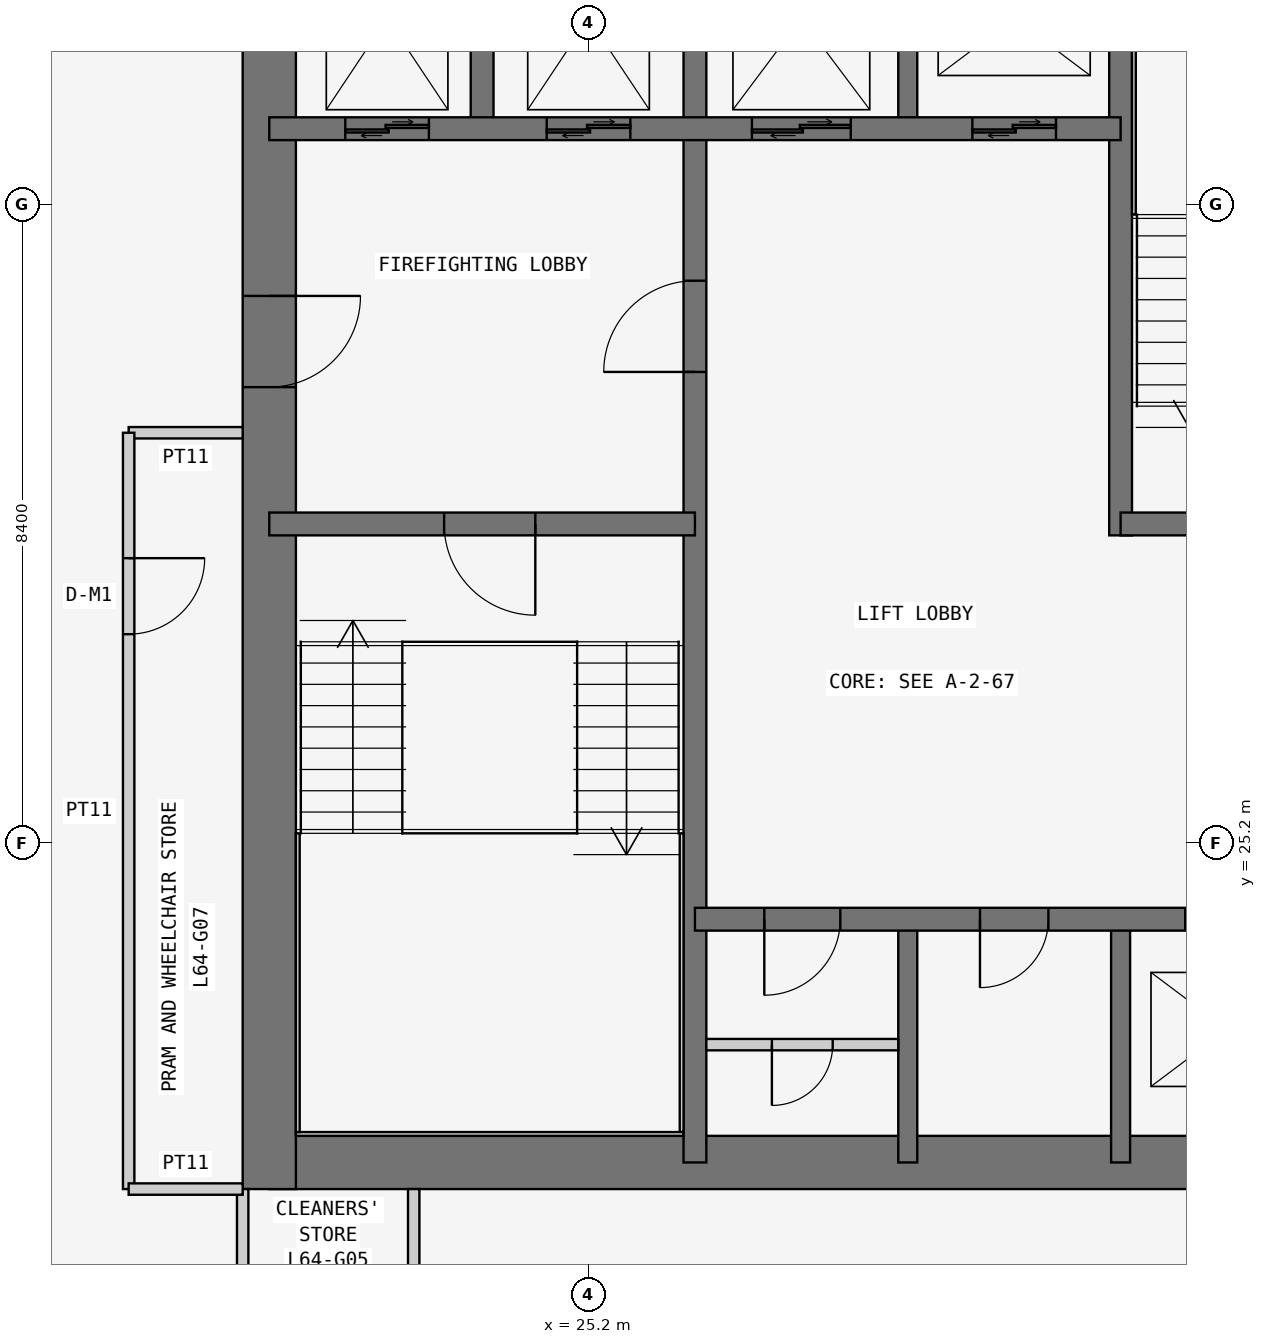
"""IFC4 building model, lengths in metres.
Left out: names, types, materials, properties, quantities, classifications, styles, units other than length and angle.
Written with IfcOpenShell. Run it as: python <this file> out.ifc"""

import sys

from ifc_helpers import new_model, si_unit, direction, frame, frame_2d, origin, place, context, subcontext, project, spatial, rectangle, extrude, element, fill, save


model = new_model("IFC4")
c1 = context("Model", 3, precision=1e-05, world=origin(), true_north=direction((0.0, 1.0)))
c2 = subcontext(c1, "Body", "Model", "MODEL_VIEW")
j1 = project(units=[si_unit("LENGTHUNIT", "METRE"), si_unit("PLANEANGLEUNIT", "RADIAN")], contexts=[c1])
p1 = place(None, origin())
s1 = spatial("IfcSite", under=j1, at=p1, CompositionType="ELEMENT")
p2 = place(p1, origin())
s2 = spatial("IfcBuilding", under=s1, at=p2, CompositionType="ELEMENT")
p3 = place(p2, frame((0.0, 0.0, 244.5)))
s3 = spatial("IfcBuildingStorey", under=s2, at=p3, CompositionType="ELEMENT", Elevation=244.5)
p4 = place(p3, frame((21.0, 21.0, 0.0), z_axis=(0.0, 0.0, 1.0), x_axis=(1.0, 0.0, 0.0)))
e1 = element("IfcWall", 1, at=p4, inside=s3, PredefinedType="SHEAR", context=c2, shape_type="SweptSolid", body=[
    extrude(rectangle(XDim=17.15, YDim=0.7, at=frame_2d((8.575, 0.0))), origin(), (0.0, 0.0, 1.0), 3.6),
])
p5 = place(p3, frame((21.0, 37.8, 0.0), z_axis=(0.0, 0.0, 1.0), x_axis=(0.0, -1.0, 0.0)))
e2 = element("IfcWall", 2, at=p5, inside=s3, PredefinedType="SHEAR", context=c2, shape_type="SweptSolid", body=[
    extrude(rectangle(XDim=17.15, YDim=0.7, at=frame_2d((8.575, 0.0))), origin(), (0.0, 0.0, 1.0), 3.6),
])
p6 = place(p5, frame((5.4, 0.0, 0.0)))
e3 = element("IfcOpeningElement", 3, at=p6, cuts=e2, PredefinedType="OPENING", context=c2, shape_type="SweptSolid", body=[
    extrude(rectangle(XDim=1.2, YDim=2.1, at=frame_2d((0.6, 1.05))), frame((0.0, 0.36, 0.0), z_axis=(0.0, -1.0, 0.0), x_axis=(1.0, 0.0, 0.0)), (0.0, 0.0, 1.0), 0.72),
])
p7 = place(p3, frame((26.6, 21.0, 0.0), z_axis=(0.0, 0.0, 1.0), x_axis=(0.0, 1.0, 0.0)))
e4 = element("IfcWall", 4, at=p7, inside=s3, PredefinedType="SHEAR", context=c2, shape_type="SweptSolid", body=[
    extrude(rectangle(XDim=16.8, YDim=0.3, at=frame_2d((8.4, 0.0))), origin(), (0.0, 0.0, 1.0), 3.6),
])
p8 = place(p7, frame((10.4, 0.0, 0.0)))
e5 = element("IfcOpeningElement", 5, at=p8, cuts=e4, PredefinedType="OPENING", context=c2, shape_type="SweptSolid", body=[
    extrude(rectangle(XDim=1.2, YDim=2.1, at=frame_2d((0.6, 1.05))), frame((0.0, 0.16, 0.0), z_axis=(0.0, -1.0, 0.0), x_axis=(1.0, 0.0, 0.0)), (0.0, 0.0, 1.0), 0.32),
])
p9 = place(p3, frame((21.0, 29.4, 0.0), z_axis=(0.0, 0.0, 1.0), x_axis=(1.0, 0.0, 0.0)))
e6 = element("IfcWall", 6, at=p9, inside=s3, PredefinedType="SHEAR", context=c2, shape_type="SweptSolid", body=[
    extrude(rectangle(XDim=5.6, YDim=0.3, at=frame_2d((2.8, 0.0))), origin(), (0.0, 0.0, 1.0), 3.6),
])
p10 = place(p9, frame((2.3, 0.0, 0.0)))
e7 = element("IfcOpeningElement", 7, at=p10, cuts=e6, PredefinedType="OPENING", context=c2, shape_type="SweptSolid", body=[
    extrude(rectangle(XDim=1.2, YDim=2.1, at=frame_2d((0.6, 1.05))), frame((0.0, 0.16, 0.0), z_axis=(0.0, -1.0, 0.0), x_axis=(1.0, 0.0, 0.0)), (0.0, 0.0, 1.0), 0.32),
])
p11 = place(p3, frame((21.0, 34.6, 0.0), z_axis=(0.0, 0.0, 1.0), x_axis=(1.0, 0.0, 0.0)))
e8 = element("IfcWall", 8, at=p11, inside=s3, PredefinedType="SHEAR", context=c2, shape_type="SweptSolid", body=[
    extrude(rectangle(XDim=11.2, YDim=0.3, at=frame_2d((5.6, 0.0))), origin(), (0.0, 0.0, 1.0), 3.6),
])
p12 = place(p11, frame((9.25, 0.0, 0.0)))
e9 = element("IfcOpeningElement", 9, at=p12, cuts=e8, PredefinedType="OPENING", context=c2, shape_type="SweptSolid", body=[
    extrude(rectangle(XDim=1.1, YDim=2.1, at=frame_2d((0.55, 1.05))), frame((0.0, 0.16, 0.0), z_axis=(0.0, -1.0, 0.0), x_axis=(1.0, 0.0, 0.0)), (0.0, 0.0, 1.0), 0.32),
])
p13 = place(p11, frame((1.0, 0.0, 0.0)))
e10 = element("IfcOpeningElement", 10, at=p13, cuts=e8, PredefinedType="OPENING", context=c2, shape_type="SweptSolid", body=[
    extrude(rectangle(XDim=1.1, YDim=2.1, at=frame_2d((0.55, 1.05))), frame((0.0, 0.16, 0.0), z_axis=(0.0, -1.0, 0.0), x_axis=(1.0, 0.0, 0.0)), (0.0, 0.0, 1.0), 0.32),
])
p14 = place(p11, frame((3.65, 0.0, 0.0)))
e11 = element("IfcOpeningElement", 11, at=p14, cuts=e8, PredefinedType="OPENING", context=c2, shape_type="SweptSolid", body=[
    extrude(rectangle(XDim=1.1, YDim=2.1, at=frame_2d((0.55, 1.05))), frame((0.0, 0.16, 0.0), z_axis=(0.0, -1.0, 0.0), x_axis=(1.0, 0.0, 0.0)), (0.0, 0.0, 1.0), 0.32),
])
p15 = place(p11, frame((6.35, 0.0, 0.0)))
e12 = element("IfcOpeningElement", 12, at=p15, cuts=e8, PredefinedType="OPENING", context=c2, shape_type="SweptSolid", body=[
    extrude(rectangle(XDim=1.3, YDim=2.1, at=frame_2d((0.65, 1.05))), frame((0.0, 0.16, 0.0), z_axis=(0.0, -1.0, 0.0), x_axis=(1.0, 0.0, 0.0)), (0.0, 0.0, 1.0), 0.32),
])
p16 = place(p3, frame((23.8, 34.6, 0.0), z_axis=(0.0, 0.0, 1.0), x_axis=(0.0, 1.0, 0.0)))
e13 = element("IfcWall", 13, at=p16, inside=s3, PredefinedType="SHEAR", context=c2, shape_type="SweptSolid", body=[
    extrude(rectangle(XDim=3.2, YDim=0.3, at=frame_2d((1.6, 0.0))), origin(), (0.0, 0.0, 1.0), 3.6),
])
p17 = place(p3, frame((26.6, 24.2, 0.0), z_axis=(0.0, 0.0, 1.0), x_axis=(1.0, 0.0, 0.0)))
e14 = element("IfcWall", 14, at=p17, inside=s3, PredefinedType="SHEAR", context=c2, shape_type="SweptSolid", body=[
    extrude(rectangle(XDim=11.2, YDim=0.3, at=frame_2d((5.6, 0.0))), origin(), (0.0, 0.0, 1.0), 3.6),
])
p18 = place(p17, frame((0.913, 0.0, 0.0)))
e15 = element("IfcOpeningElement", 15, at=p18, cuts=e14, PredefinedType="OPENING", context=c2, shape_type="SweptSolid", body=[
    extrude(rectangle(XDim=1.0, YDim=2.1, at=frame_2d((0.5, 1.05))), frame((0.0, 0.16, 0.0), z_axis=(0.0, -1.0, 0.0), x_axis=(1.0, 0.0, 0.0)), (0.0, 0.0, 1.0), 0.32),
])
p19 = place(p17, frame((3.75, 0.0, 0.0)))
e16 = element("IfcOpeningElement", 16, at=p19, cuts=e14, PredefinedType="OPENING", context=c2, shape_type="SweptSolid", body=[
    extrude(rectangle(XDim=0.9, YDim=2.1, at=frame_2d((0.45, 1.05))), frame((0.0, 0.16, 0.0), z_axis=(0.0, -1.0, 0.0), x_axis=(1.0, 0.0, 0.0)), (0.0, 0.0, 1.0), 0.32),
])
p20 = place(p17, frame((6.45, 0.0, 0.0)))
e17 = element("IfcOpeningElement", 17, at=p20, cuts=e14, PredefinedType="OPENING", context=c2, shape_type="SweptSolid", body=[
    extrude(rectangle(XDim=1.1, YDim=2.1, at=frame_2d((0.55, 1.05))), frame((0.0, 0.16, 0.0), z_axis=(0.0, -1.0, 0.0), x_axis=(1.0, 0.0, 0.0)), (0.0, 0.0, 1.0), 0.32),
])
p21 = place(p17, frame((9.1, 0.0, 0.0)))
e18 = element("IfcOpeningElement", 18, at=p21, cuts=e14, PredefinedType="OPENING", context=c2, shape_type="SweptSolid", body=[
    extrude(rectangle(XDim=1.1, YDim=2.1, at=frame_2d((0.55, 1.05))), frame((0.0, 0.16, 0.0), z_axis=(0.0, -1.0, 0.0), x_axis=(1.0, 0.0, 0.0)), (0.0, 0.0, 1.0), 0.32),
])
p22 = place(p3, frame((32.2, 29.25, 0.0), z_axis=(0.0, 0.0, 1.0), x_axis=(0.0, 1.0, 0.0)))
e19 = element("IfcWall", 19, at=p22, inside=s3, PredefinedType="SHEAR", context=c2, shape_type="SweptSolid", body=[
    extrude(rectangle(XDim=8.55, YDim=0.3, at=frame_2d((4.275, 0.0))), origin(), (0.0, 0.0, 1.0), 3.6),
])
p23 = place(p3, frame((32.2, 29.4, 0.0), z_axis=(0.0, 0.0, 1.0), x_axis=(1.0, 0.0, 0.0)))
e20 = element("IfcWall", 20, at=p23, inside=s3, PredefinedType="SHEAR", context=c2, shape_type="SweptSolid", body=[
    extrude(rectangle(XDim=5.6, YDim=0.3, at=frame_2d((2.8, 0.0))), origin(), (0.0, 0.0, 1.0), 3.6),
])
p24 = place(p23, frame((2.0, 0.0, 0.0)))
e21 = element("IfcOpeningElement", 21, at=p24, cuts=e20, PredefinedType="OPENING", context=c2, shape_type="SweptSolid", body=[
    extrude(rectangle(XDim=1.2, YDim=2.1, at=frame_2d((0.6, 1.05))), frame((0.0, 0.16, 0.0), z_axis=(0.0, -1.0, 0.0), x_axis=(1.0, 0.0, 0.0)), (0.0, 0.0, 1.0), 0.32),
])
for number, where, z_axis, x_axis in (
    (22, (29.4, 21.0, 0.0), (0.0, 0.0, 1.0), (0.0, 1.0, 0.0)),
    (23, (32.2, 21.0, 0.0), (0.0, 0.0, 1.0), (0.0, 1.0, 0.0)),
    (24, (29.4, 34.6, 0.0), (0.0, 0.0, 1.0), (0.0, 1.0, 0.0)),
):
    element("IfcWall", number, at=place(p3, frame(where, z_axis=z_axis, x_axis=x_axis)), inside=s3, PredefinedType="SHEAR", context=c2, shape_type="SweptSolid", body=[
        extrude(rectangle(XDim=3.2, YDim=0.25, at=frame_2d((1.6, 0.0))), origin(), (0.0, 0.0, 1.0), 3.6),
    ])
for number, where, z_axis, x_axis in (
    (25, (20.65, 20.65, 0.0), (0.0, 0.0, 1.0), (0.0, -1.0, 0.0)),
    (26, (22.9, 18.2, 0.0), (0.0, 0.0, 1.0), (0.0, 1.0, 0.0)),
):
    element("IfcWall", number, at=place(p3, frame(where, z_axis=z_axis, x_axis=x_axis)), inside=s3, PredefinedType="PARTITIONING", context=c2, shape_type="SweptSolid", body=[
        extrude(rectangle(XDim=2.45, YDim=0.15, at=frame_2d((1.225, 0.0))), origin(), (0.0, 0.0, 1.0), 3.35),
    ])
p25 = place(p3, frame((20.65, 30.6, 0.0), z_axis=(0.0, 0.0, 1.0), x_axis=(-1.0, 0.0, 0.0)))
e27 = element("IfcWall", 27, at=p25, inside=s3, PredefinedType="PARTITIONING", context=c2, shape_type="SweptSolid", body=[
    extrude(rectangle(XDim=1.5, YDim=0.15, at=frame_2d((0.75, 0.0))), origin(), (0.0, 0.0, 1.0), 3.35),
])
p26 = place(p3, frame((19.15, 30.6, 0.0), z_axis=(0.0, 0.0, 1.0), x_axis=(0.0, -1.0, 0.0)))
e28 = element("IfcWall", 28, at=p26, inside=s3, PredefinedType="PARTITIONING", context=c2, shape_type="SweptSolid", body=[
    extrude(rectangle(XDim=9.95, YDim=0.15, at=frame_2d((4.975, 0.0))), origin(), (0.0, 0.0, 1.0), 3.35),
])
p27 = place(p26, frame((1.65, 0.0, 0.0)))
e29 = element("IfcOpeningElement", 29, at=p27, cuts=e28, PredefinedType="OPENING", context=c2, shape_type="SweptSolid", body=[
    extrude(rectangle(XDim=1.0, YDim=2.1, at=frame_2d((0.5, 1.05))), frame((0.0, 0.085, 0.0), z_axis=(0.0, -1.0, 0.0), x_axis=(1.0, 0.0, 0.0)), (0.0, 0.0, 1.0), 0.17),
])
p28 = place(p3, frame((19.15, 20.65, 0.0), z_axis=(0.0, 0.0, 1.0), x_axis=(1.0, 0.0, 0.0)))
e30 = element("IfcWall", 30, at=p28, inside=s3, PredefinedType="PARTITIONING", context=c2, shape_type="SweptSolid", body=[
    extrude(rectangle(XDim=1.5, YDim=0.15, at=frame_2d((0.75, 0.0))), origin(), (0.0, 0.0, 1.0), 3.35),
])
p29 = place(p3, frame((26.75, 22.55, 0.0), z_axis=(0.0, 0.0, 1.0), x_axis=(1.0, 0.0, 0.0)))
e31 = element("IfcWall", 31, at=p29, inside=s3, PredefinedType="PARTITIONING", context=c2, shape_type="SweptSolid", body=[
    extrude(rectangle(XDim=2.525, YDim=0.15, at=frame_2d((1.262, 0.0))), origin(), (0.0, 0.0, 1.0), 3.35),
])
p30 = place(p29, frame((0.863, 0.0, 0.0)))
e32 = element("IfcOpeningElement", 32, at=p30, cuts=e31, PredefinedType="OPENING", context=c2, shape_type="SweptSolid", body=[
    extrude(rectangle(XDim=0.8, YDim=2.1, at=frame_2d((0.4, 1.05))), frame((0.0, 0.085, 0.0), z_axis=(0.0, -1.0, 0.0), x_axis=(1.0, 0.0, 0.0)), (0.0, 0.0, 1.0), 0.17),
])
p31 = place(p3, frame((21.35, 21.375, 1.8), z_axis=(0.0, 0.0, 1.0), x_axis=(1.0, 0.0, 0.0)))
e33 = element("IfcWall", 33, at=p31, inside=s3, PredefinedType="PARTITIONING", context=c2, shape_type="SweptSolid", body=[
    extrude(rectangle(XDim=5.1, YDim=0.05, at=frame_2d((2.55, 0.0))), origin(), (0.0, 0.0, 1.0), 1.8),
])
for number, where, z_axis, x_axis in (
    (34, (21.375, 25.33, 1.8), (0.0, 0.0, 1.0), (0.0, -1.0, 0.0)),
    (35, (26.425, 25.33, 1.8), (0.0, 0.0, 1.0), (0.0, -1.0, 0.0)),
):
    element("IfcWall", number, at=place(p3, frame(where, z_axis=z_axis, x_axis=x_axis)), inside=s3, PredefinedType="PARTITIONING", context=c2, shape_type="SweptSolid", body=[
        extrude(rectangle(XDim=3.93, YDim=0.05, at=frame_2d((1.965, 0.0))), origin(), (0.0, 0.0, 1.0), 1.8),
    ])
p32 = place(p3, frame((32.375, 33.47, 1.8), z_axis=(0.0, 0.0, 1.0), x_axis=(0.0, 1.0, 0.0)))
e36 = element("IfcWall", 36, at=p32, inside=s3, PredefinedType="PARTITIONING", context=c2, shape_type="SweptSolid", body=[
    extrude(rectangle(XDim=3.93, YDim=0.05, at=frame_2d((1.965, 0.0))), origin(), (0.0, 0.0, 1.0), 1.8),
])
p33 = place(p27, origin())
e37 = element("IfcDoor", 37, at=p33, inside=s3, OperationType="SINGLE_SWING_LEFT", PredefinedType="DOOR", context=c2, shape_type="SweptSolid", body=[
    extrude(rectangle(XDim=1.0, YDim=2.1, at=frame_2d((0.5, 1.05))), frame((0.0, 0.025, 0.0), z_axis=(0.0, -1.0, 0.0), x_axis=(1.0, 0.0, 0.0)), (0.0, 0.0, 1.0), 0.05),
])
fill(e29, e37)
p34 = place(p6, origin())
e38 = element("IfcDoor", 38, at=p34, inside=s3, OperationType="SINGLE_SWING_LEFT", PredefinedType="DOOR", context=c2, shape_type="SweptSolid", body=[
    extrude(rectangle(XDim=1.2, YDim=2.1, at=frame_2d((0.6, 1.05))), frame((0.0, 0.025, 0.0), z_axis=(0.0, -1.0, 0.0), x_axis=(1.0, 0.0, 0.0)), (0.0, 0.0, 1.0), 0.05),
])
fill(e3, e38)
p35 = place(p10, frame((1.2, 0.0, 0.0), z_axis=(0.0, 0.0, 1.0), x_axis=(-1.0, 0.0, 0.0)))
e39 = element("IfcDoor", 39, at=p35, inside=s3, OperationType="SINGLE_SWING_LEFT", PredefinedType="DOOR", context=c2, shape_type="SweptSolid", body=[
    extrude(rectangle(XDim=1.2, YDim=2.1, at=frame_2d((0.6, 1.05))), frame((0.0, 0.025, 0.0), z_axis=(0.0, -1.0, 0.0), x_axis=(1.0, 0.0, 0.0)), (0.0, 0.0, 1.0), 0.05),
])
fill(e7, e39)
p36 = place(p8, origin())
e40 = element("IfcDoor", 40, at=p36, inside=s3, OperationType="SINGLE_SWING_LEFT", PredefinedType="DOOR", context=c2, shape_type="SweptSolid", body=[
    extrude(rectangle(XDim=1.2, YDim=2.1, at=frame_2d((0.6, 1.05))), frame((0.0, 0.025, 0.0), z_axis=(0.0, -1.0, 0.0), x_axis=(1.0, 0.0, 0.0)), (0.0, 0.0, 1.0), 0.05),
])
fill(e5, e40)
p37 = place(p18, frame((1.0, 0.0, 0.0), z_axis=(0.0, 0.0, 1.0), x_axis=(-1.0, 0.0, 0.0)))
e41 = element("IfcDoor", 41, at=p37, inside=s3, OperationType="SINGLE_SWING_RIGHT", PredefinedType="DOOR", context=c2, shape_type="SweptSolid", body=[
    extrude(rectangle(XDim=1.0, YDim=2.1, at=frame_2d((0.5, 1.05))), frame((0.0, 0.025, 0.0), z_axis=(0.0, -1.0, 0.0), x_axis=(1.0, 0.0, 0.0)), (0.0, 0.0, 1.0), 0.05),
])
fill(e15, e41)
p38 = place(p30, frame((0.8, 0.0, 0.0), z_axis=(0.0, 0.0, 1.0), x_axis=(-1.0, 0.0, 0.0)))
e42 = element("IfcDoor", 42, at=p38, inside=s3, OperationType="SINGLE_SWING_RIGHT", PredefinedType="DOOR", context=c2, shape_type="SweptSolid", body=[
    extrude(rectangle(XDim=0.8, YDim=2.1, at=frame_2d((0.4, 1.05))), frame((0.0, 0.025, 0.0), z_axis=(0.0, -1.0, 0.0), x_axis=(1.0, 0.0, 0.0)), (0.0, 0.0, 1.0), 0.05),
])
fill(e32, e42)
p39 = place(p19, frame((0.9, 0.0, 0.0), z_axis=(0.0, 0.0, 1.0), x_axis=(-1.0, 0.0, 0.0)))
e43 = element("IfcDoor", 43, at=p39, inside=s3, OperationType="SINGLE_SWING_RIGHT", PredefinedType="DOOR", context=c2, shape_type="SweptSolid", body=[
    extrude(rectangle(XDim=0.9, YDim=2.1, at=frame_2d((0.45, 1.05))), frame((0.0, 0.025, 0.0), z_axis=(0.0, -1.0, 0.0), x_axis=(1.0, 0.0, 0.0)), (0.0, 0.0, 1.0), 0.05),
])
fill(e16, e43)
p40 = place(p20, origin())
e44 = element("IfcDoor", 44, at=p40, inside=s3, OperationType="DOUBLE_DOOR_SLIDING", PredefinedType="DOOR", context=c2, shape_type="SweptSolid", body=[
    extrude(rectangle(XDim=1.1, YDim=2.1, at=frame_2d((0.55, 1.05))), frame((0.0, 0.025, 0.0), z_axis=(0.0, -1.0, 0.0), x_axis=(1.0, 0.0, 0.0)), (0.0, 0.0, 1.0), 0.05),
])
fill(e17, e44)
p41 = place(p12, origin())
e45 = element("IfcDoor", 45, at=p41, inside=s3, OperationType="DOUBLE_DOOR_SLIDING", PredefinedType="DOOR", context=c2, shape_type="SweptSolid", body=[
    extrude(rectangle(XDim=1.1, YDim=2.1, at=frame_2d((0.55, 1.05))), frame((0.0, 0.025, 0.0), z_axis=(0.0, -1.0, 0.0), x_axis=(1.0, 0.0, 0.0)), (0.0, 0.0, 1.0), 0.05),
])
fill(e9, e45)
p42 = place(p13, origin())
e46 = element("IfcDoor", 46, at=p42, inside=s3, OperationType="DOUBLE_DOOR_SLIDING", PredefinedType="DOOR", context=c2, shape_type="SweptSolid", body=[
    extrude(rectangle(XDim=1.1, YDim=2.1, at=frame_2d((0.55, 1.05))), frame((0.0, 0.025, 0.0), z_axis=(0.0, -1.0, 0.0), x_axis=(1.0, 0.0, 0.0)), (0.0, 0.0, 1.0), 0.05),
])
fill(e10, e46)
p43 = place(p14, origin())
e47 = element("IfcDoor", 47, at=p43, inside=s3, OperationType="DOUBLE_DOOR_SLIDING", PredefinedType="DOOR", context=c2, shape_type="SweptSolid", body=[
    extrude(rectangle(XDim=1.1, YDim=2.1, at=frame_2d((0.55, 1.05))), frame((0.0, 0.025, 0.0), z_axis=(0.0, -1.0, 0.0), x_axis=(1.0, 0.0, 0.0)), (0.0, 0.0, 1.0), 0.05),
])
fill(e11, e47)
p44 = place(p15, origin())
e48 = element("IfcDoor", 48, at=p44, inside=s3, OperationType="DOUBLE_DOOR_SLIDING", PredefinedType="DOOR", context=c2, shape_type="SweptSolid", body=[
    extrude(rectangle(XDim=1.3, YDim=2.1, at=frame_2d((0.65, 1.05))), frame((0.0, 0.025, 0.0), z_axis=(0.0, -1.0, 0.0), x_axis=(1.0, 0.0, 0.0)), (0.0, 0.0, 1.0), 0.05),
])
fill(e12, e48)
save(model, sys.argv[1])
